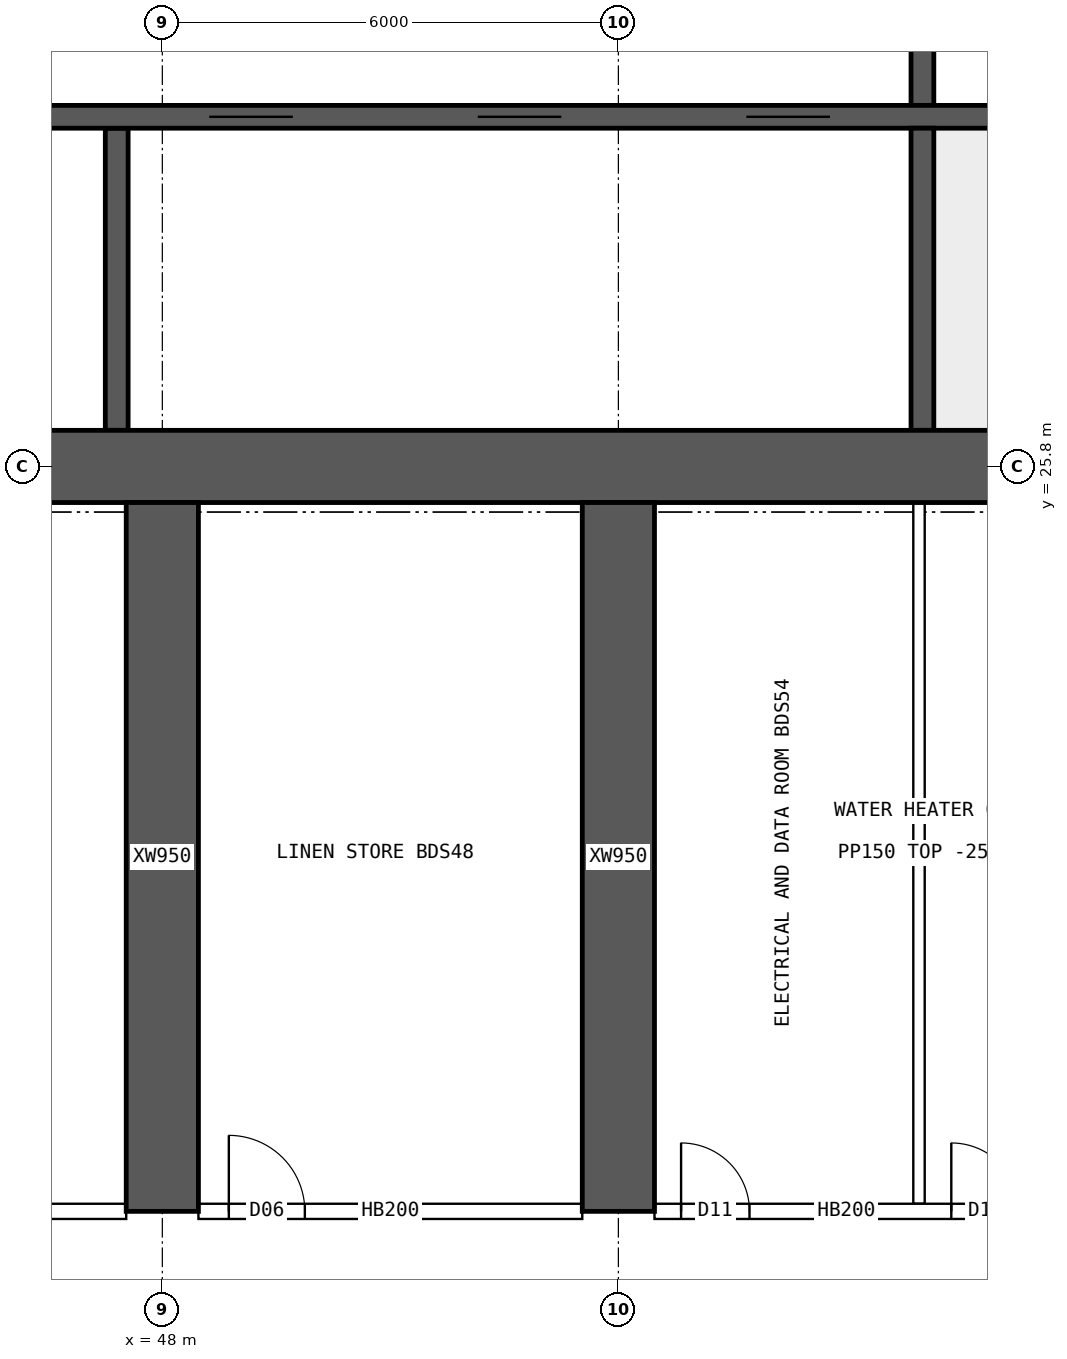
"""IFC4 building model, lengths in metres.
Left out: names, types, materials, properties, quantities, classifications, styles, units other than length and angle.
Written with IfcOpenShell. Run it as: python <this file> out.ifc"""

import sys

from ifc_helpers import new_model, si_unit, direction, frame, frame_2d, origin, place, context, subcontext, project, spatial, rectangle, extrude, element, fill, save


model = new_model("IFC4")
c1 = context("Model", 3, precision=1e-05, world=origin(), true_north=direction((0.0, 1.0)))
c2 = subcontext(c1, "Body", "Model", "MODEL_VIEW")
j1 = project(units=[si_unit("LENGTHUNIT", "METRE"), si_unit("PLANEANGLEUNIT", "RADIAN")], contexts=[c1])
p1 = place(None, origin())
s1 = spatial("IfcSite", under=j1, at=p1, CompositionType="ELEMENT")
p2 = place(p1, origin())
s2 = spatial("IfcBuilding", under=s1, at=p2, CompositionType="ELEMENT")
p3 = place(p2, frame((0.0, 0.0, 84.4)))
s3 = spatial("IfcBuildingStorey", under=s2, at=p3, CompositionType="ELEMENT", Elevation=84.4)
p4 = place(p3, frame((18.0, 25.8, 0.0), z_axis=(0.0, 0.0, 1.0), x_axis=(1.0, 0.0, 0.0)))
e1 = element("IfcWall", 1, at=p4, inside=s3, PredefinedType="SHEAR", context=c2, shape_type="SweptSolid", body=[
    extrude(rectangle(XDim=48.0, YDim=0.95, at=frame_2d((24.0, 0.0))), origin(), (0.0, 0.0, 1.0), 3.75),
])
p5 = place(p3, frame((18.475, 30.4, 0.0), z_axis=(0.0, 0.0, 1.0), x_axis=(1.0, 0.0, 0.0)))
e2 = element("IfcWall", 2, at=p5, inside=s3, PredefinedType="SHEAR", context=c2, shape_type="SweptSolid", body=[
    extrude(rectangle(XDim=47.05, YDim=0.3, at=frame_2d((23.525, 0.0))), origin(), (0.0, 0.0, 1.0), 3.75),
])
p6 = place(p5, frame((0.4, 0.0, 0.0)))
e3 = element("IfcOpeningElement", 3, at=p6, cuts=e2, PredefinedType="OPENING", context=c2, shape_type="SweptSolid", body=[
    extrude(rectangle(XDim=1.0, YDim=2.1, at=frame_2d((0.5, 1.05))), frame((0.0, 0.16, 0.0), z_axis=(0.0, -1.0, 0.0), x_axis=(1.0, 0.0, 0.0)), (0.0, 0.0, 1.0), 0.32),
])
p7 = place(p5, frame((45.65, 0.0, 0.0)))
e4 = element("IfcOpeningElement", 4, at=p7, cuts=e2, PredefinedType="OPENING", context=c2, shape_type="SweptSolid", body=[
    extrude(rectangle(XDim=1.0, YDim=2.1, at=frame_2d((0.5, 1.05))), frame((0.0, 0.16, 0.0), z_axis=(0.0, -1.0, 0.0), x_axis=(1.0, 0.0, 0.0)), (0.0, 0.0, 1.0), 0.32),
])
p8 = place(p5, frame((8.275, 0.0, 0.0)))
e5 = element("IfcOpeningElement", 5, at=p8, cuts=e2, PredefinedType="OPENING", context=c2, shape_type="SweptSolid", body=[
    extrude(rectangle(XDim=1.1, YDim=2.1, at=frame_2d((0.55, 1.05))), frame((0.0, 0.16, 0.0), z_axis=(0.0, -1.0, 0.0), x_axis=(1.0, 0.0, 0.0)), (0.0, 0.0, 1.0), 0.32),
])
p9 = place(p5, frame((10.875, 0.0, 0.0)))
e6 = element("IfcOpeningElement", 6, at=p9, cuts=e2, PredefinedType="OPENING", context=c2, shape_type="SweptSolid", body=[
    extrude(rectangle(XDim=1.1, YDim=2.1, at=frame_2d((0.55, 1.05))), frame((0.0, 0.16, 0.0), z_axis=(0.0, -1.0, 0.0), x_axis=(1.0, 0.0, 0.0)), (0.0, 0.0, 1.0), 0.32),
])
p10 = place(p5, frame((13.475, 0.0, 0.0)))
e7 = element("IfcOpeningElement", 7, at=p10, cuts=e2, PredefinedType="OPENING", context=c2, shape_type="SweptSolid", body=[
    extrude(rectangle(XDim=1.1, YDim=2.1, at=frame_2d((0.55, 1.05))), frame((0.0, 0.16, 0.0), z_axis=(0.0, -1.0, 0.0), x_axis=(1.0, 0.0, 0.0)), (0.0, 0.0, 1.0), 0.32),
])
p11 = place(p5, frame((16.075, 0.0, 0.0)))
e8 = element("IfcOpeningElement", 8, at=p11, cuts=e2, PredefinedType="OPENING", context=c2, shape_type="SweptSolid", body=[
    extrude(rectangle(XDim=1.1, YDim=2.1, at=frame_2d((0.55, 1.05))), frame((0.0, 0.16, 0.0), z_axis=(0.0, -1.0, 0.0), x_axis=(1.0, 0.0, 0.0)), (0.0, 0.0, 1.0), 0.32),
])
p12 = place(p5, frame((18.85, 0.0, 0.0)))
e9 = element("IfcOpeningElement", 9, at=p12, cuts=e2, PredefinedType="OPENING", context=c2, shape_type="SweptSolid", body=[
    extrude(rectangle(XDim=0.9, YDim=2.1, at=frame_2d((0.45, 1.05))), frame((0.0, 0.16, 0.0), z_axis=(0.0, -1.0, 0.0), x_axis=(1.0, 0.0, 0.0)), (0.0, 0.0, 1.0), 0.32),
])
p13 = place(p5, frame((30.142, 0.0, 0.0)))
e10 = element("IfcOpeningElement", 10, at=p13, cuts=e2, PredefinedType="OPENING", context=c2, shape_type="SweptSolid", body=[
    extrude(rectangle(XDim=1.1, YDim=2.1, at=frame_2d((0.55, 1.05))), frame((0.0, 0.16, 0.0), z_axis=(0.0, -1.0, 0.0), x_axis=(1.0, 0.0, 0.0)), (0.0, 0.0, 1.0), 0.32),
])
p14 = place(p5, frame((33.675, 0.0, 0.0)))
e11 = element("IfcOpeningElement", 11, at=p14, cuts=e2, PredefinedType="OPENING", context=c2, shape_type="SweptSolid", body=[
    extrude(rectangle(XDim=1.1, YDim=2.1, at=frame_2d((0.55, 1.05))), frame((0.0, 0.16, 0.0), z_axis=(0.0, -1.0, 0.0), x_axis=(1.0, 0.0, 0.0)), (0.0, 0.0, 1.0), 0.32),
])
p15 = place(p5, frame((37.208, 0.0, 0.0)))
e12 = element("IfcOpeningElement", 12, at=p15, cuts=e2, PredefinedType="OPENING", context=c2, shape_type="SweptSolid", body=[
    extrude(rectangle(XDim=1.1, YDim=2.1, at=frame_2d((0.55, 1.05))), frame((0.0, 0.16, 0.0), z_axis=(0.0, -1.0, 0.0), x_axis=(1.0, 0.0, 0.0)), (0.0, 0.0, 1.0), 0.32),
])
p16 = place(p3, frame((58.0, 26.275, 0.0), z_axis=(0.0, 0.0, 1.0), x_axis=(0.0, 1.0, 0.0)))
e13 = element("IfcWall", 13, at=p16, inside=s3, PredefinedType="SHEAR", context=c2, shape_type="SweptSolid", body=[
    extrude(rectangle(XDim=3.975, YDim=0.3, at=frame_2d((1.988, 0.0))), origin(), (0.0, 0.0, 1.0), 3.75),
])
p17 = place(p3, frame((58.0, 30.55, 0.0), z_axis=(0.0, 0.0, 1.0), x_axis=(0.0, 1.0, 0.0)))
e14 = element("IfcWall", 14, at=p17, inside=s3, PredefinedType="SHEAR", context=c2, shape_type="SweptSolid", body=[
    extrude(rectangle(XDim=3.9, YDim=0.3, at=frame_2d((1.95, 0.0))), origin(), (0.0, 0.0, 1.0), 3.75),
])
p18 = place(p17, frame((1.4, 0.0, 0.0)))
e15 = element("IfcOpeningElement", 15, at=p18, cuts=e14, PredefinedType="OPENING", context=c2, shape_type="SweptSolid", body=[
    extrude(rectangle(XDim=1.2, YDim=2.1, at=frame_2d((0.6, 1.05))), frame((0.0, 0.16, 0.0), z_axis=(0.0, -1.0, 0.0), x_axis=(1.0, 0.0, 0.0)), (0.0, 0.0, 1.0), 0.32),
])
p19 = place(p3, frame((47.4, 26.275, 0.0), z_axis=(0.0, 0.0, 1.0), x_axis=(0.0, 1.0, 0.0)))
e16 = element("IfcWall", 16, at=p19, inside=s3, PredefinedType="SHEAR", context=c2, shape_type="SweptSolid", body=[
    extrude(rectangle(XDim=3.975, YDim=0.3, at=frame_2d((1.988, 0.0))), origin(), (0.0, 0.0, 1.0), 3.75),
])
for number, where, z_axis, x_axis in (
    (17, (48.0, 16.0, 0.0), (0.0, 0.0, 1.0), (0.0, 1.0, 0.0)),
    (18, (54.0, 16.0, 0.0), (0.0, 0.0, 1.0), (0.0, 1.0, 0.0)),
):
    element("IfcWall", number, at=place(p3, frame(where, z_axis=z_axis, x_axis=x_axis)), inside=s3, PredefinedType="SHEAR", context=c2, shape_type="SweptSolid", body=[
        extrude(rectangle(XDim=9.325, YDim=0.95, at=frame_2d((4.663, 0.0))), origin(), (0.0, 0.0, 1.0), 3.75),
    ])
p20 = place(p3, frame((42.475, 16.0, 0.0), z_axis=(0.0, 0.0, 1.0), x_axis=(1.0, 0.0, 0.0)))
e19 = element("IfcWall", 19, at=p20, inside=s3, PredefinedType="SOLIDWALL", context=c2, shape_type="SweptSolid", body=[
    extrude(rectangle(XDim=5.05, YDim=0.2, at=frame_2d((2.525, 0.0))), origin(), (0.0, 0.0, 1.0), 3.5),
])
p21 = place(p20, frame((0.35, 0.0, 0.0)))
e20 = element("IfcOpeningElement", 20, at=p21, cuts=e19, PredefinedType="OPENING", context=c2, shape_type="SweptSolid", body=[
    extrude(rectangle(XDim=0.9, YDim=2.1, at=frame_2d((0.45, 1.05))), frame((0.0, 0.11, 0.0), z_axis=(0.0, -1.0, 0.0), x_axis=(1.0, 0.0, 0.0)), (0.0, 0.0, 1.0), 0.22),
])
p22 = place(p20, frame((2.345, 0.0, 0.0)))
e21 = element("IfcOpeningElement", 21, at=p22, cuts=e19, PredefinedType="OPENING", context=c2, shape_type="SweptSolid", body=[
    extrude(rectangle(XDim=0.9, YDim=2.1, at=frame_2d((0.45, 1.05))), frame((0.0, 0.11, 0.0), z_axis=(0.0, -1.0, 0.0), x_axis=(1.0, 0.0, 0.0)), (0.0, 0.0, 1.0), 0.22),
])
p23 = place(p3, frame((48.475, 16.0, 0.0), z_axis=(0.0, 0.0, 1.0), x_axis=(1.0, 0.0, 0.0)))
e22 = element("IfcWall", 22, at=p23, inside=s3, PredefinedType="SOLIDWALL", context=c2, shape_type="SweptSolid", body=[
    extrude(rectangle(XDim=5.05, YDim=0.2, at=frame_2d((2.525, 0.0))), origin(), (0.0, 0.0, 1.0), 3.5),
])
p24 = place(p23, frame((0.4, 0.0, 0.0)))
e23 = element("IfcOpeningElement", 23, at=p24, cuts=e22, PredefinedType="OPENING", context=c2, shape_type="SweptSolid", body=[
    extrude(rectangle(XDim=1.0, YDim=2.1, at=frame_2d((0.5, 1.05))), frame((0.0, 0.11, 0.0), z_axis=(0.0, -1.0, 0.0), x_axis=(1.0, 0.0, 0.0)), (0.0, 0.0, 1.0), 0.22),
])
p25 = place(p3, frame((54.475, 16.0, 0.0), z_axis=(0.0, 0.0, 1.0), x_axis=(1.0, 0.0, 0.0)))
e24 = element("IfcWall", 24, at=p25, inside=s3, PredefinedType="SOLIDWALL", context=c2, shape_type="SweptSolid", body=[
    extrude(rectangle(XDim=5.05, YDim=0.2, at=frame_2d((2.525, 0.0))), origin(), (0.0, 0.0, 1.0), 3.5),
])
p26 = place(p25, frame((0.35, 0.0, 0.0)))
e25 = element("IfcOpeningElement", 25, at=p26, cuts=e24, PredefinedType="OPENING", context=c2, shape_type="SweptSolid", body=[
    extrude(rectangle(XDim=0.9, YDim=2.1, at=frame_2d((0.45, 1.05))), frame((0.0, 0.11, 0.0), z_axis=(0.0, -1.0, 0.0), x_axis=(1.0, 0.0, 0.0)), (0.0, 0.0, 1.0), 0.22),
])
p27 = place(p25, frame((3.905, 0.0, 0.0)))
e26 = element("IfcOpeningElement", 26, at=p27, cuts=e24, PredefinedType="OPENING", context=c2, shape_type="SweptSolid", body=[
    extrude(rectangle(XDim=0.9, YDim=2.1, at=frame_2d((0.45, 1.05))), frame((0.0, 0.11, 0.0), z_axis=(0.0, -1.0, 0.0), x_axis=(1.0, 0.0, 0.0)), (0.0, 0.0, 1.0), 0.22),
])
p28 = place(p3, frame((57.955, 16.1, 0.0), z_axis=(0.0, 0.0, 1.0), x_axis=(0.0, 1.0, 0.0)))
e27 = element("IfcWall", 27, at=p28, inside=s3, PredefinedType="PARTITIONING", context=c2, shape_type="SweptSolid", body=[
    extrude(rectangle(XDim=9.225, YDim=0.15, at=frame_2d((4.612, 0.0))), origin(), (0.0, 0.0, 1.0), 3.5),
])
p29 = place(p13, origin())
e28 = element("IfcDoor", 28, at=p29, inside=s3, OperationType="DOUBLE_DOOR_SLIDING", PredefinedType="DOOR", context=c2, shape_type="SweptSolid", body=[
    extrude(rectangle(XDim=1.1, YDim=2.1, at=frame_2d((0.55, 1.05))), frame((0.0, 0.025, 0.0), z_axis=(0.0, -1.0, 0.0), x_axis=(1.0, 0.0, 0.0)), (0.0, 0.0, 1.0), 0.05),
])
fill(e10, e28)
p30 = place(p14, origin())
e29 = element("IfcDoor", 29, at=p30, inside=s3, OperationType="DOUBLE_DOOR_SLIDING", PredefinedType="DOOR", context=c2, shape_type="SweptSolid", body=[
    extrude(rectangle(XDim=1.1, YDim=2.1, at=frame_2d((0.55, 1.05))), frame((0.0, 0.025, 0.0), z_axis=(0.0, -1.0, 0.0), x_axis=(1.0, 0.0, 0.0)), (0.0, 0.0, 1.0), 0.05),
])
fill(e11, e29)
p31 = place(p15, origin())
e30 = element("IfcDoor", 30, at=p31, inside=s3, OperationType="DOUBLE_DOOR_SLIDING", PredefinedType="DOOR", context=c2, shape_type="SweptSolid", body=[
    extrude(rectangle(XDim=1.1, YDim=2.1, at=frame_2d((0.55, 1.05))), frame((0.0, 0.025, 0.0), z_axis=(0.0, -1.0, 0.0), x_axis=(1.0, 0.0, 0.0)), (0.0, 0.0, 1.0), 0.05),
])
fill(e12, e30)
p32 = place(p24, origin())
e31 = element("IfcDoor", 31, at=p32, inside=s3, OperationType="SINGLE_SWING_LEFT", PredefinedType="DOOR", context=c2, shape_type="SweptSolid", body=[
    extrude(rectangle(XDim=1.0, YDim=2.1, at=frame_2d((0.5, 1.05))), frame((0.0, 0.025, 0.0), z_axis=(0.0, -1.0, 0.0), x_axis=(1.0, 0.0, 0.0)), (0.0, 0.0, 1.0), 0.05),
])
fill(e23, e31)
p33 = place(p26, origin())
e32 = element("IfcDoor", 32, at=p33, inside=s3, OperationType="SINGLE_SWING_LEFT", PredefinedType="DOOR", context=c2, shape_type="SweptSolid", body=[
    extrude(rectangle(XDim=0.9, YDim=2.1, at=frame_2d((0.45, 1.05))), frame((0.0, 0.025, 0.0), z_axis=(0.0, -1.0, 0.0), x_axis=(1.0, 0.0, 0.0)), (0.0, 0.0, 1.0), 0.05),
])
fill(e25, e32)
p34 = place(p27, origin())
e33 = element("IfcDoor", 33, at=p34, inside=s3, OperationType="SINGLE_SWING_LEFT", PredefinedType="DOOR", context=c2, shape_type="SweptSolid", body=[
    extrude(rectangle(XDim=0.9, YDim=2.1, at=frame_2d((0.45, 1.05))), frame((0.0, 0.025, 0.0), z_axis=(0.0, -1.0, 0.0), x_axis=(1.0, 0.0, 0.0)), (0.0, 0.0, 1.0), 0.05),
])
fill(e26, e33)
save(model, sys.argv[1])
